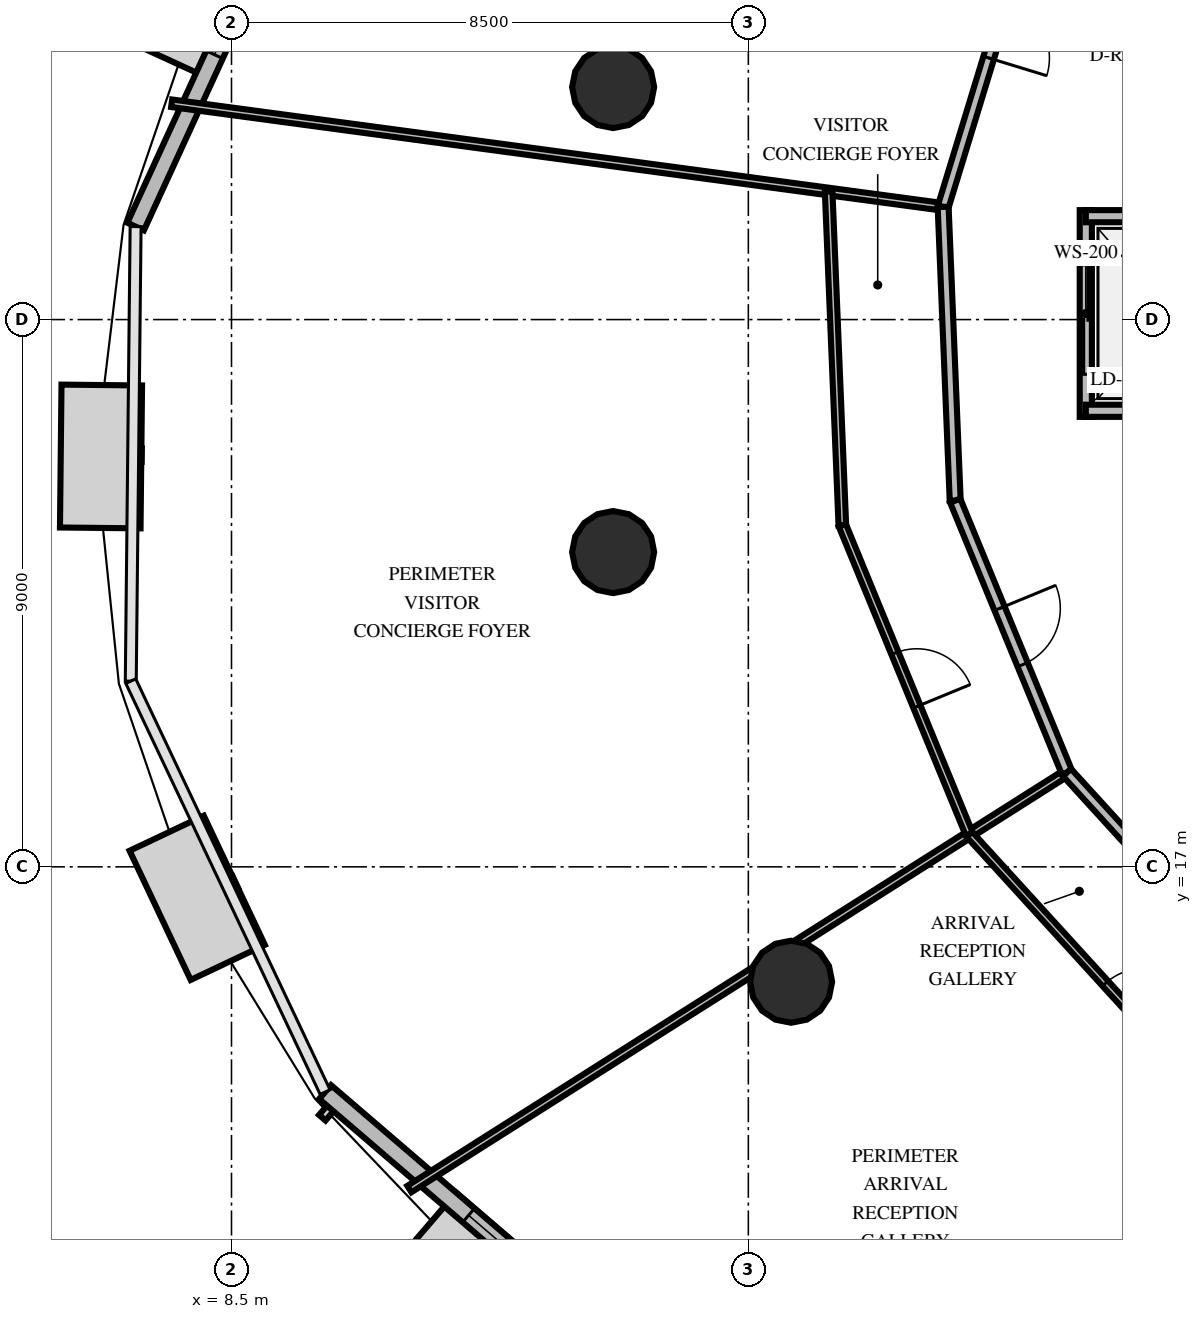
"""IFC4 building model, lengths in metres.
Left out: names, types, materials, properties, quantities, classifications, styles, units other than length and angle.
Written with IfcOpenShell. Run it as: python <this file> out.ifc"""

import sys

from ifc_helpers import new_model, si_unit, direction, frame, frame_2d, origin, origin_2d, place, context, subcontext, project, spatial, rectangle, circle, extrude, element, fill, save


model = new_model("IFC4")
c1 = context("Model", 3, precision=1e-05, world=origin(), true_north=direction((0.0, 1.0)))
c2 = subcontext(c1, "Body", "Model", "MODEL_VIEW")
j1 = project(units=[si_unit("LENGTHUNIT", "METRE"), si_unit("PLANEANGLEUNIT", "RADIAN")], contexts=[c1])
p1 = place(None, origin())
s1 = spatial("IfcSite", under=j1, at=p1, CompositionType="ELEMENT")
p2 = place(p1, origin())
s2 = spatial("IfcBuilding", under=s1, at=p2, CompositionType="ELEMENT")
p3 = place(p2, frame((0.0, 0.0, 84.6)))
s3 = spatial("IfcBuildingStorey", under=s2, at=p3, CompositionType="ELEMENT", Elevation=84.6)
for number, where, z_axis, x_axis in (
    (1, (14.777, 29.824, 0.0), (0.0, 0.0, 1.0), (1.0, 0.0, 0.0)),
    (2, (14.777, 22.176, 0.0), (0.0, 0.0, 1.0), (1.0, 0.0, 0.0)),
    (3, (17.703, 15.111, 0.0), (0.0, 0.0, 1.0), (1.0, 0.0, 0.0)),
):
    element("IfcColumn", number, at=place(p3, frame(where, z_axis=z_axis, x_axis=x_axis)), inside=s3, PredefinedType="COLUMN", context=c2, shape_type="SweptSolid", body=[
        extrude(circle(Radius=0.675, at=origin_2d()), origin(), (0.0, 0.0, 1.0), 4.2),
    ])
p4 = place(p3, frame((10.268, 34.82, 0.0), z_axis=(0.0, 0.0, 1.0), x_axis=(-0.417063391763, -0.908877399461, 0.0)))
e4 = element("IfcWall", 4, at=p4, inside=s3, PredefinedType="SOLIDWALL", context=c2, shape_type="SweptSolid", body=[
    extrude(rectangle(XDim=8.021, YDim=0.3, at=frame_2d((4.011, 0.0))), origin(), (0.0, 0.0, 1.0), 2.96),
])
p5 = place(p4, frame((3.111, 0.0, 0.8)))
e5 = element("IfcOpeningElement", 5, at=p5, cuts=e4, PredefinedType="OPENING", context=c2, shape_type="SweptSolid", body=[
    extrude(rectangle(XDim=1.8, YDim=1.95, at=frame_2d((0.9, 0.975))), frame((0.0, 0.16, 0.0), z_axis=(0.0, -1.0, 0.0), x_axis=(1.0, 0.0, 0.0)), (0.0, 0.0, 1.0), 0.32),
])
p6 = place(p3, frame((10.039, 13.296, 0.0), z_axis=(0.0, 0.0, 1.0), x_axis=(0.758684823953, -0.651457855815, 0.0)))
e6 = element("IfcWall", 6, at=p6, inside=s3, PredefinedType="SOLIDWALL", context=c2, shape_type="SweptSolid", body=[
    extrude(rectangle(XDim=8.021, YDim=0.3, at=frame_2d((4.011, 0.0))), origin(), (0.0, 0.0, 1.0), 2.96),
])
p7 = place(p6, frame((3.111, 0.0, 0.8)))
e7 = element("IfcOpeningElement", 7, at=p7, cuts=e6, PredefinedType="OPENING", context=c2, shape_type="SweptSolid", body=[
    extrude(rectangle(XDim=1.8, YDim=1.95, at=frame_2d((0.9, 0.975))), frame((0.0, 0.16, 0.0), z_axis=(0.0, -1.0, 0.0), x_axis=(1.0, 0.0, 0.0)), (0.0, 0.0, 1.0), 0.32),
])
p8 = place(p3, frame((22.55, 24.4, 0.0), z_axis=(0.0, 0.0, 1.0), x_axis=(0.0, 1.0, 0.0)))
e8 = element("IfcWall", 8, at=p8, inside=s3, PredefinedType="SOLIDWALL", context=c2, shape_type="SweptSolid", body=[
    extrude(rectangle(XDim=3.4, YDim=0.2, at=frame_2d((1.7, 0.0))), origin(), (0.0, 0.0, 1.0), 2.96),
])
p9 = place(p8, frame((0.7, 0.0, 0.0)))
e9 = element("IfcOpeningElement", 9, at=p9, cuts=e8, PredefinedType="OPENING", context=c2, shape_type="SweptSolid", body=[
    extrude(rectangle(XDim=1.8, YDim=2.4, at=frame_2d((0.9, 1.2))), frame((0.0, 0.11, 0.0), z_axis=(0.0, -1.0, 0.0), x_axis=(1.0, 0.0, 0.0)), (0.0, 0.0, 1.0), 0.22),
])
for number, where, z_axis, x_axis in (
    (10, (22.55, 24.5, 0.0), (0.0, 0.0, 1.0), (1.0, 0.0, 0.0)),
    (11, (22.55, 27.7, 0.0), (0.0, 0.0, 1.0), (1.0, 0.0, 0.0)),
):
    element("IfcWall", number, at=place(p3, frame(where, z_axis=z_axis, x_axis=x_axis)), inside=s3, PredefinedType="SOLIDWALL", context=c2, shape_type="SweptSolid", body=[
        extrude(rectangle(XDim=2.8, YDim=0.2, at=frame_2d((1.4, 0.0))), origin(), (0.0, 0.0, 1.0), 2.96),
    ])
p10 = place(p3, frame((20.204, 27.853, 0.0), z_axis=(0.0, 0.0, 1.0), x_axis=(-0.991098685538, 0.133129243689, 0.0)))
e12 = element("IfcWall", 12, at=p10, inside=s3, PredefinedType="PARTITIONING", context=c2, shape_type="SweptSolid", body=[
    extrude(rectangle(XDim=12.802, YDim=0.125, at=frame_2d((6.401, 0.0))), origin(), (0.0, 0.0, 1.0), 2.96),
])
p11 = place(p3, frame((21.523, 32.171, 0.0), z_axis=(0.0, 0.0, 1.0), x_axis=(-0.292101763449, -0.956387243636, 0.0)))
e13 = element("IfcWall", 13, at=p11, inside=s3, PredefinedType="PARTITIONING", context=c2, shape_type="SweptSolid", body=[
    extrude(rectangle(XDim=4.515, YDim=0.18, at=frame_2d((2.258, 0.0))), origin(), (0.0, 0.0, 1.0), 2.96),
])
p12 = place(p11, frame((0.954, 0.0, 0.0)))
e14 = element("IfcOpeningElement", 14, at=p12, cuts=e13, PredefinedType="OPENING", context=c2, shape_type="SweptSolid", body=[
    extrude(rectangle(XDim=1.0, YDim=2.15, at=frame_2d((0.5, 1.075))), frame((0.0, 0.1, 0.0), z_axis=(0.0, -1.0, 0.0), x_axis=(1.0, 0.0, 0.0)), (0.0, 0.0, 1.0), 0.2),
])
p13 = place(p3, frame((22.24, 18.552, 0.0), z_axis=(0.0, 0.0, 1.0), x_axis=(-0.844793501384, -0.535092459318, 0.0)))
e15 = element("IfcWall", 15, at=p13, inside=s3, PredefinedType="PARTITIONING", context=c2, shape_type="SweptSolid", body=[
    extrude(rectangle(XDim=12.802, YDim=0.125, at=frame_2d((6.401, 0.0))), origin(), (0.0, 0.0, 1.0), 2.96),
])
p14 = place(p3, frame((20.204, 27.853, 0.0), z_axis=(0.0, 0.0, 1.0), x_axis=(0.041006671954, -0.99915887268, 0.0)))
e16 = element("IfcWall", 16, at=p14, inside=s3, PredefinedType="PARTITIONING", context=c2, shape_type="SweptSolid", body=[
    extrude(rectangle(XDim=4.834, YDim=0.18, at=frame_2d((2.417, 0.0))), origin(), (0.0, 0.0, 1.0), 2.96),
])
p15 = place(p3, frame((20.402, 23.023, 0.0), z_axis=(0.0, 0.0, 1.0), x_axis=(0.380272236521, -0.924874600219, 0.0)))
e17 = element("IfcWall", 17, at=p15, inside=s3, PredefinedType="PARTITIONING", context=c2, shape_type="SweptSolid", body=[
    extrude(rectangle(XDim=4.834, YDim=0.18, at=frame_2d((2.417, 0.0))), origin(), (0.0, 0.0, 1.0), 2.96),
])
p16 = place(p15, frame((1.917, 0.0, 0.0)))
e18 = element("IfcOpeningElement", 18, at=p16, cuts=e17, PredefinedType="OPENING", context=c2, shape_type="SweptSolid", body=[
    extrude(rectangle(XDim=1.0, YDim=2.15, at=frame_2d((0.5, 1.075))), frame((0.0, 0.1, 0.0), z_axis=(0.0, -1.0, 0.0), x_axis=(1.0, 0.0, 0.0)), (0.0, 0.0, 1.0), 0.2),
])
p17 = place(p3, frame((18.321, 28.106, 0.0), z_axis=(0.0, 0.0, 1.0), x_axis=(0.041015046574, -0.999158528941, 0.0)))
e19 = element("IfcWall", 19, at=p17, inside=s3, PredefinedType="PARTITIONING", context=c2, shape_type="SweptSolid", body=[
    extrude(rectangle(XDim=5.494, YDim=0.125, at=frame_2d((2.747, 0.0))), origin(), (0.0, 0.0, 1.0), 2.96),
])
p18 = place(p3, frame((18.546, 22.616, 0.0), z_axis=(0.0, 0.0, 1.0), x_axis=(0.380237945348, -0.924888698665, 0.0)))
e20 = element("IfcWall", 20, at=p18, inside=s3, PredefinedType="PARTITIONING", context=c2, shape_type="SweptSolid", body=[
    extrude(rectangle(XDim=5.494, YDim=0.125, at=frame_2d((2.747, 0.0))), origin(), (0.0, 0.0, 1.0), 2.96),
])
p19 = place(p18, frame((2.272, 0.0, 0.0)))
e21 = element("IfcOpeningElement", 21, at=p19, cuts=e20, PredefinedType="OPENING", context=c2, shape_type="SweptSolid", body=[
    extrude(rectangle(XDim=0.95, YDim=2.15, at=frame_2d((0.475, 1.075))), frame((0.0, 0.073, 0.0), z_axis=(0.0, -1.0, 0.0), x_axis=(1.0, 0.0, 0.0)), (0.0, 0.0, 1.0), 0.145),
])
p20 = place(p3, frame((22.24, 18.552, 0.0), z_axis=(0.0, 0.0, 1.0), x_axis=(0.673677614221, -0.739025352811, 0.0)))
e22 = element("IfcWall", 22, at=p20, inside=s3, PredefinedType="PARTITIONING", context=c2, shape_type="SweptSolid", body=[
    extrude(rectangle(XDim=4.834, YDim=0.18, at=frame_2d((2.417, 0.0))), origin(), (0.0, 0.0, 1.0), 2.96),
])
p21 = place(p20, frame((2.801, 0.0, 0.0)))
e23 = element("IfcOpeningElement", 23, at=p21, cuts=e22, PredefinedType="OPENING", context=c2, shape_type="SweptSolid", body=[
    extrude(rectangle(XDim=1.0, YDim=2.15, at=frame_2d((0.5, 1.075))), frame((0.0, 0.1, 0.0), z_axis=(0.0, -1.0, 0.0), x_axis=(1.0, 0.0, 0.0)), (0.0, 0.0, 1.0), 0.2),
])
p22 = place(p3, frame((20.635, 17.535, 0.0), z_axis=(0.0, 0.0, 1.0), x_axis=(0.673669644178, -0.739032618031, 0.0)))
e24 = element("IfcWall", 24, at=p22, inside=s3, PredefinedType="PARTITIONING", context=c2, shape_type="SweptSolid", body=[
    extrude(rectangle(XDim=5.494, YDim=0.125, at=frame_2d((2.747, 0.0))), origin(), (0.0, 0.0, 1.0), 2.96),
])
p23 = place(p22, frame((3.318, 0.0, 0.0)))
e25 = element("IfcOpeningElement", 25, at=p23, cuts=e24, PredefinedType="OPENING", context=c2, shape_type="SweptSolid", body=[
    extrude(rectangle(XDim=0.95, YDim=2.15, at=frame_2d((0.475, 1.075))), frame((0.0, 0.073, 0.0), z_axis=(0.0, -1.0, 0.0), x_axis=(1.0, 0.0, 0.0)), (0.0, 0.0, 1.0), 0.145),
])
p24 = place(p5, origin())
e26 = element("IfcWindow", 26, at=p24, inside=s3, PartitioningType="SINGLE_PANEL", PredefinedType="WINDOW", context=c2, shape_type="SweptSolid", body=[
    extrude(rectangle(XDim=1.8, YDim=1.95, at=frame_2d((0.9, 0.975))), frame((0.0, 0.03, 0.0), z_axis=(0.0, -1.0, 0.0), x_axis=(1.0, 0.0, 0.0)), (0.0, 0.0, 1.0), 0.06),
])
fill(e5, e26)
p25 = place(p7, origin())
e27 = element("IfcWindow", 27, at=p25, inside=s3, PartitioningType="SINGLE_PANEL", PredefinedType="WINDOW", context=c2, shape_type="SweptSolid", body=[
    extrude(rectangle(XDim=1.8, YDim=1.95, at=frame_2d((0.9, 0.975))), frame((0.0, 0.03, 0.0), z_axis=(0.0, -1.0, 0.0), x_axis=(1.0, 0.0, 0.0)), (0.0, 0.0, 1.0), 0.06),
])
fill(e7, e27)
p26 = place(p9, origin())
e28 = element("IfcDoor", 28, at=p26, inside=s3, OperationType="DOUBLE_DOOR_SLIDING", PredefinedType="USERDEFINED", context=c2, shape_type="SweptSolid", body=[
    extrude(rectangle(XDim=1.8, YDim=2.4, at=frame_2d((0.9, 1.2))), frame((0.0, 0.025, 0.0), z_axis=(0.0, -1.0, 0.0), x_axis=(1.0, 0.0, 0.0)), (0.0, 0.0, 1.0), 0.05),
])
fill(e9, e28)
p27 = place(p12, origin())
e29 = element("IfcDoor", 29, at=p27, inside=s3, OperationType="SINGLE_SWING_RIGHT", PredefinedType="DOOR", context=c2, shape_type="SweptSolid", body=[
    extrude(rectangle(XDim=1.0, YDim=2.15, at=frame_2d((0.5, 1.075))), frame((0.0, 0.025, 0.0), z_axis=(0.0, -1.0, 0.0), x_axis=(1.0, 0.0, 0.0)), (0.0, 0.0, 1.0), 0.05),
])
fill(e14, e29)
p28 = place(p16, origin())
e30 = element("IfcDoor", 30, at=p28, inside=s3, OperationType="SINGLE_SWING_LEFT", PredefinedType="DOOR", context=c2, shape_type="SweptSolid", body=[
    extrude(rectangle(XDim=1.0, YDim=2.15, at=frame_2d((0.5, 1.075))), frame((0.0, 0.025, 0.0), z_axis=(0.0, -1.0, 0.0), x_axis=(1.0, 0.0, 0.0)), (0.0, 0.0, 1.0), 0.05),
])
fill(e18, e30)
p29 = place(p19, origin())
e31 = element("IfcDoor", 31, at=p29, inside=s3, OperationType="SINGLE_SWING_RIGHT", PredefinedType="DOOR", context=c2, shape_type="SweptSolid", body=[
    extrude(rectangle(XDim=0.95, YDim=2.15, at=frame_2d((0.475, 1.075))), frame((0.0, 0.025, 0.0), z_axis=(0.0, -1.0, 0.0), x_axis=(1.0, 0.0, 0.0)), (0.0, 0.0, 1.0), 0.05),
])
fill(e21, e31)
p30 = place(p23, origin())
e32 = element("IfcDoor", 32, at=p30, inside=s3, OperationType="SINGLE_SWING_RIGHT", PredefinedType="DOOR", context=c2, shape_type="SweptSolid", body=[
    extrude(rectangle(XDim=0.95, YDim=2.15, at=frame_2d((0.475, 1.075))), frame((0.0, 0.025, 0.0), z_axis=(0.0, -1.0, 0.0), x_axis=(1.0, 0.0, 0.0)), (0.0, 0.0, 1.0), 0.05),
])
fill(e25, e32)
save(model, sys.argv[1])
